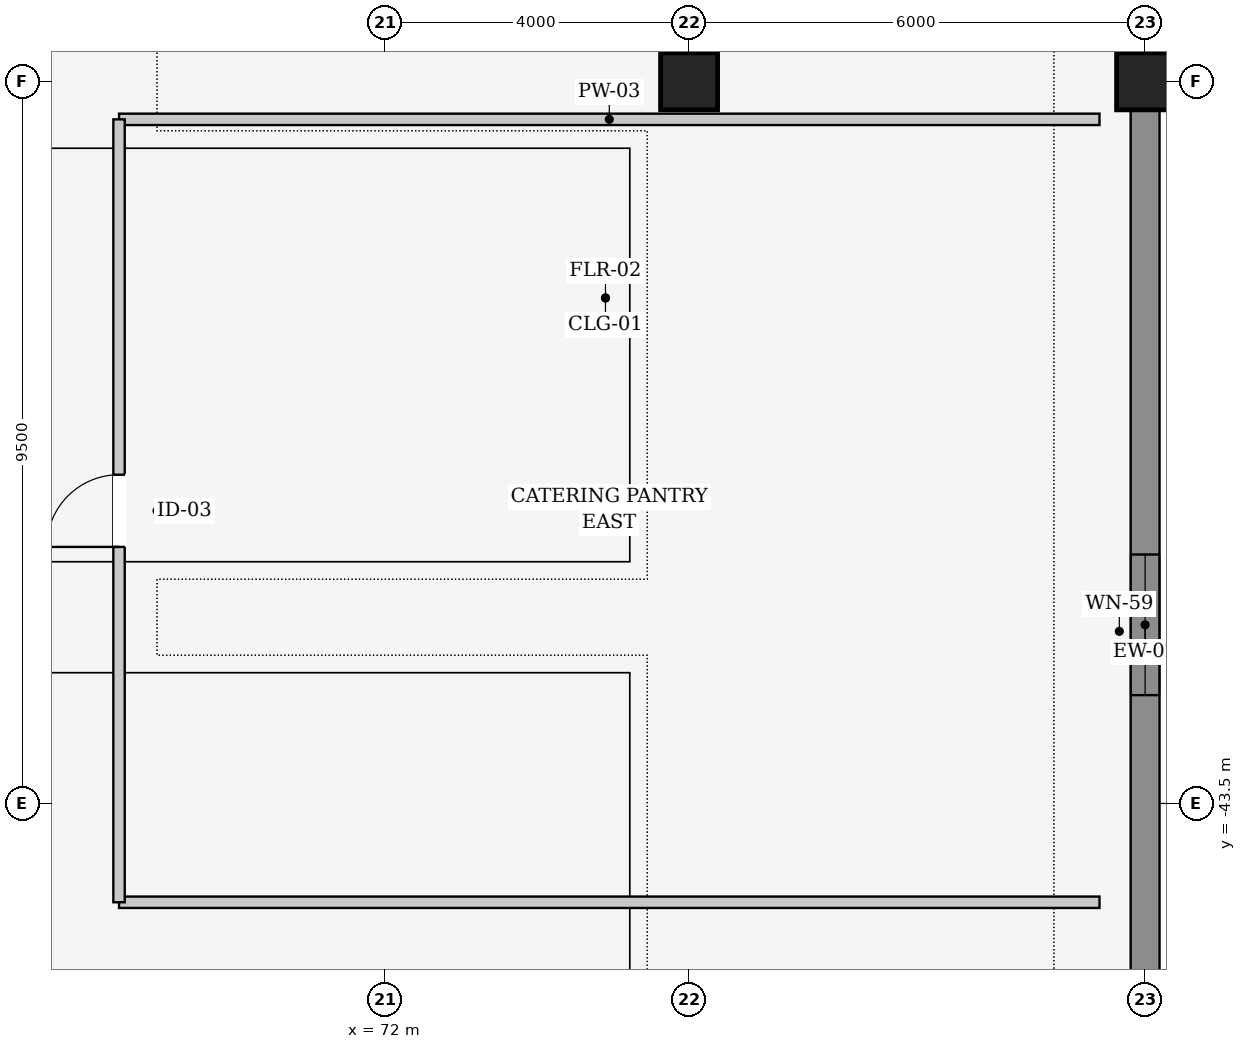
"""IFC4 building model, lengths in metres.
Left out: names, types, materials, properties, quantities, classifications, styles, units other than length and angle.
Written with IfcOpenShell. Run it as: python <this file> out.ifc"""

import sys

from ifc_helpers import new_model, si_unit, direction, frame, frame_2d, origin, origin_2d, place, context, subcontext, project, spatial, rectangle, extrude, element, fill, save


model = new_model("IFC4")
c1 = context("Model", 3, precision=1e-05, world=origin(), true_north=direction((0.0, 1.0)))
c2 = subcontext(c1, "Body", "Model", "MODEL_VIEW")
j1 = project(units=[si_unit("LENGTHUNIT", "METRE"), si_unit("PLANEANGLEUNIT", "RADIAN")], contexts=[c1])
p1 = place(None, origin())
s1 = spatial("IfcSite", under=j1, at=p1, CompositionType="ELEMENT")
p2 = place(p1, origin())
s2 = spatial("IfcBuilding", under=s1, at=p2, CompositionType="ELEMENT")
p3 = place(p2, frame((0.0, 0.0, 21.0)))
s3 = spatial("IfcBuildingStorey", under=s2, at=p3, CompositionType="ELEMENT", Elevation=21.0)
for number, where, z_axis, x_axis in (
    (1, (76.0, -34.0, 0.0), (0.0, 0.0, 1.0), (1.0, 0.0, 0.0)),
    (2, (82.0, -34.0, 0.0), (0.0, 0.0, 1.0), (1.0, 0.0, 0.0)),
):
    element("IfcColumn", number, at=place(p3, frame(where, z_axis=z_axis, x_axis=x_axis)), inside=s3, PredefinedType="COLUMN", context=c2, shape_type="SweptSolid", body=[
        extrude(rectangle(XDim=0.75, YDim=0.75, at=origin_2d()), origin(), (0.0, 0.0, 1.0), 5.4),
    ])
p4 = place(p3, frame((82.0, -34.357, 0.0), z_axis=(0.0, 0.0, 1.0), x_axis=(0.0, -1.0, 0.0)))
e3 = element("IfcWall", 3, at=p4, inside=s3, PredefinedType="SOLIDWALL", context=c2, shape_type="SweptSolid", body=[
    extrude(rectangle(XDim=13.586, YDim=0.38, at=frame_2d((6.793, 0.0))), origin(), (0.0, 0.0, 1.0), 4.36),
])
p5 = place(p4, frame((5.868, 0.0, 0.9)))
e4 = element("IfcOpeningElement", 4, at=p5, cuts=e3, PredefinedType="OPENING", context=c2, shape_type="SweptSolid", body=[
    extrude(rectangle(XDim=1.85, YDim=2.8, at=frame_2d((0.925, 1.4))), frame((0.0, 0.2, 0.0), z_axis=(0.0, -1.0, 0.0), x_axis=(1.0, 0.0, 0.0)), (0.0, 0.0, 1.0), 0.4),
])
p6 = place(p3, frame((68.5, -34.5, 0.0), z_axis=(0.0, 0.0, 1.0), x_axis=(1.0, 0.0, 0.0)))
e5 = element("IfcWall", 5, at=p6, inside=s3, PredefinedType="PARTITIONING", context=c2, shape_type="SweptSolid", body=[
    extrude(rectangle(XDim=12.9, YDim=0.15, at=frame_2d((6.45, 0.0))), origin(), (0.0, 0.0, 1.0), 4.145),
])
p7 = place(p3, frame((81.4, -44.8, 0.0), z_axis=(0.0, 0.0, 1.0), x_axis=(-1.0, 0.0, 0.0)))
e6 = element("IfcWall", 6, at=p7, inside=s3, PredefinedType="PARTITIONING", context=c2, shape_type="SweptSolid", body=[
    extrude(rectangle(XDim=12.9, YDim=0.15, at=frame_2d((6.45, 0.0))), origin(), (0.0, 0.0, 1.0), 4.562),
])
p8 = place(p3, frame((68.5, -44.8, 0.0), z_axis=(0.0, 0.0, 1.0), x_axis=(0.0, 1.0, 0.0)))
e7 = element("IfcWall", 7, at=p8, inside=s3, PredefinedType="PARTITIONING", context=c2, shape_type="SweptSolid", body=[
    extrude(rectangle(XDim=10.3, YDim=0.15, at=frame_2d((5.15, 0.0))), origin(), (0.0, 0.0, 1.0), 4.145),
])
p9 = place(p8, frame((4.675, 0.0, 0.0)))
e8 = element("IfcOpeningElement", 8, at=p9, cuts=e7, PredefinedType="OPENING", context=c2, shape_type="SweptSolid", body=[
    extrude(rectangle(XDim=0.95, YDim=2.15, at=frame_2d((0.475, 1.075))), frame((0.0, 0.085, 0.0), z_axis=(0.0, -1.0, 0.0), x_axis=(1.0, 0.0, 0.0)), (0.0, 0.0, 1.0), 0.17),
])
p10 = place(p5, origin())
e9 = element("IfcWindow", 9, at=p10, inside=s3, PartitioningType="SINGLE_PANEL", PredefinedType="WINDOW", context=c2, shape_type="SweptSolid", body=[
    extrude(rectangle(XDim=1.85, YDim=2.8, at=frame_2d((0.925, 1.4))), frame((0.0, 0.03, 0.0), z_axis=(0.0, -1.0, 0.0), x_axis=(1.0, 0.0, 0.0)), (0.0, 0.0, 1.0), 0.06),
])
fill(e4, e9)
p11 = place(p9, origin())
e10 = element("IfcDoor", 10, at=p11, inside=s3, OperationType="SINGLE_SWING_LEFT", PredefinedType="DOOR", context=c2, shape_type="SweptSolid", body=[
    extrude(rectangle(XDim=0.95, YDim=2.15, at=frame_2d((0.475, 1.075))), frame((0.0, 0.025, 0.0), z_axis=(0.0, -1.0, 0.0), x_axis=(1.0, 0.0, 0.0)), (0.0, 0.0, 1.0), 0.05),
])
fill(e8, e10)
save(model, sys.argv[1])
